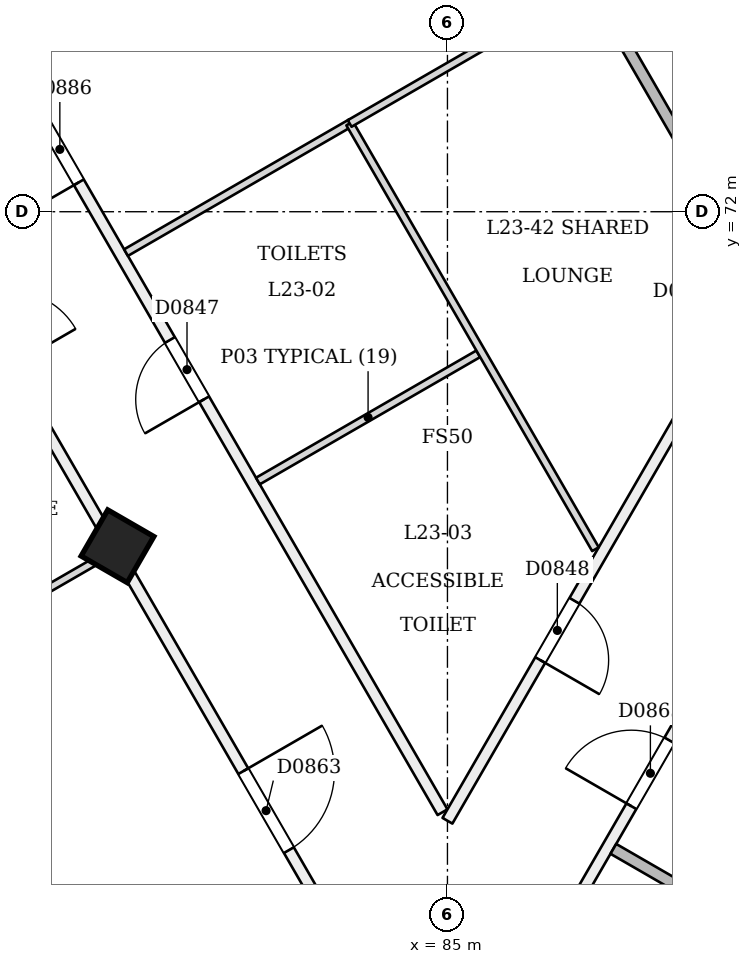
"""IFC4 building model, lengths in metres.
Left out: names, types, materials, properties, quantities, classifications, styles, units other than length and angle.
Written with IfcOpenShell. Run it as: python <this file> out.ifc"""

import sys

from ifc_helpers import new_model, si_unit, direction, frame, frame_2d, origin, origin_2d, place, context, subcontext, project, spatial, rectangle, extrude, element, fill, save


model = new_model("IFC4")
c1 = context("Model", 3, precision=1e-05, world=origin(), true_north=direction((0.0, 1.0)))
c2 = subcontext(c1, "Body", "Model", "MODEL_VIEW")
j1 = project(units=[si_unit("LENGTHUNIT", "METRE"), si_unit("PLANEANGLEUNIT", "RADIAN")], contexts=[c1])
p1 = place(None, origin())
s1 = spatial("IfcSite", under=j1, at=p1, CompositionType="ELEMENT")
p2 = place(p1, origin())
s2 = spatial("IfcBuilding", under=s1, at=p2, CompositionType="ELEMENT")
p3 = place(p2, frame((0.0, 0.0, 91.8)))
s3 = spatial("IfcBuildingStorey", under=s2, at=p3, CompositionType="ELEMENT", Elevation=91.8)
p4 = place(p3, frame((80.632, 67.552, -0.021), z_axis=(0.02215519141, 0.038415882353, 0.999016199807), x_axis=(-0.865361930339, -0.499673644695, 0.03840544644)))
e1 = element("IfcColumn", 1, at=p4, inside=s3, PredefinedType="COLUMN", context=c2, shape_type="SweptSolid", body=[
    extrude(rectangle(XDim=0.7, YDim=0.7, at=origin_2d()), origin(), (0.0, 0.0, 1.0), 3.604),
])
p5 = place(p3, frame((84.935, 64.1, 0.0), z_axis=(0.0, 0.0, 1.0), x_axis=(-0.500003132916, 0.866023594987, 0.0)))
e2 = element("IfcWall", 2, at=p5, inside=s3, PredefinedType="PARTITIONING", context=c2, shape_type="SweptSolid", body=[
    extrude(rectangle(XDim=30.368, YDim=0.15, at=frame_2d((15.184, 0.0))), origin(), (0.0, 0.0, 1.0), 3.3),
])
p6 = place(p5, frame((6.273, 0.0, 0.0)))
e3 = element("IfcOpeningElement", 3, at=p6, cuts=e2, PredefinedType="OPENING", context=c2, shape_type="SweptSolid", body=[
    extrude(rectangle(XDim=0.9, YDim=2.1, at=frame_2d((0.45, 1.05))), frame((0.0, 0.085, 0.0), z_axis=(0.0, -1.0, 0.0), x_axis=(1.0, 0.0, 0.0)), (0.0, 0.0, 1.0), 0.171),
])
p7 = place(p5, frame((21.525, 0.0, 0.0)))
e4 = element("IfcOpeningElement", 4, at=p7, cuts=e2, PredefinedType="OPENING", context=c2, shape_type="SweptSolid", body=[
    extrude(rectangle(XDim=1.0, YDim=2.1, at=frame_2d((0.5, 1.05))), frame((0.0, 0.085, 0.0), z_axis=(0.0, -1.0, 0.0), x_axis=(1.0, 0.0, 0.0)), (0.0, 0.0, 1.0), 0.171),
])
p8 = place(p5, frame((16.921, 0.0, 0.0)))
e5 = element("IfcOpeningElement", 5, at=p8, cuts=e2, PredefinedType="OPENING", context=c2, shape_type="SweptSolid", body=[
    extrude(rectangle(XDim=1.0, YDim=2.1, at=frame_2d((0.5, 1.05))), frame((0.0, 0.085, 0.0), z_axis=(0.0, -1.0, 0.0), x_axis=(1.0, 0.0, 0.0)), (0.0, 0.0, 1.0), 0.171),
])
p9 = place(p5, frame((26.041, 0.0, 0.0)))
e6 = element("IfcOpeningElement", 6, at=p9, cuts=e2, PredefinedType="OPENING", context=c2, shape_type="SweptSolid", body=[
    extrude(rectangle(XDim=1.0, YDim=2.1, at=frame_2d((0.5, 1.05))), frame((0.0, 0.085, 0.0), z_axis=(0.0, -1.0, 0.0), x_axis=(1.0, 0.0, 0.0)), (0.0, 0.0, 1.0), 0.171),
])
p10 = place(p5, frame((12.9, 0.0, 0.0)))
e7 = element("IfcOpeningElement", 7, at=p10, cuts=e2, PredefinedType="OPENING", context=c2, shape_type="SweptSolid", body=[
    extrude(rectangle(XDim=1.0, YDim=2.1, at=frame_2d((0.5, 1.05))), frame((0.0, 0.085, 0.0), z_axis=(0.0, -1.0, 0.0), x_axis=(1.0, 0.0, 0.0)), (0.0, 0.0, 1.0), 0.171),
])
p11 = place(p5, frame((9.569, 0.0, 0.0)))
e8 = element("IfcOpeningElement", 8, at=p11, cuts=e2, PredefinedType="OPENING", context=c2, shape_type="SweptSolid", body=[
    extrude(rectangle(XDim=1.0, YDim=2.1, at=frame_2d((0.5, 1.05))), frame((0.0, 0.085, 0.0), z_axis=(0.0, -1.0, 0.0), x_axis=(1.0, 0.0, 0.0)), (0.0, 0.0, 1.0), 0.171),
])
p12 = place(p3, frame((100.249, 90.4, 0.0), z_axis=(0.0, 0.0, 1.0), x_axis=(-0.500002168127, -0.866024152012, 0.0)))
e9 = element("IfcWall", 9, at=p12, inside=s3, PredefinedType="PARTITIONING", context=c2, shape_type="SweptSolid", body=[
    extrude(rectangle(XDim=30.498, YDim=0.15, at=frame_2d((15.249, 0.0))), origin(), (0.0, 0.0, 1.0), 3.3),
])
p13 = place(p12, frame((27.157, 0.0, 0.0)))
e10 = element("IfcOpeningElement", 10, at=p13, cuts=e9, PredefinedType="OPENING", context=c2, shape_type="SweptSolid", body=[
    extrude(rectangle(XDim=0.9, YDim=2.1, at=frame_2d((0.45, 1.05))), frame((0.0, 0.085, 0.0), z_axis=(0.0, -1.0, 0.0), x_axis=(1.0, 0.0, 0.0)), (0.0, 0.0, 1.0), 0.171),
])
p14 = place(p12, frame((2.412, 0.0, 0.0)))
e11 = element("IfcOpeningElement", 11, at=p14, cuts=e9, PredefinedType="OPENING", context=c2, shape_type="SweptSolid", body=[
    extrude(rectangle(XDim=1.0, YDim=2.1, at=frame_2d((0.5, 1.05))), frame((0.0, 0.085, 0.0), z_axis=(0.0, -1.0, 0.0), x_axis=(1.0, 0.0, 0.0)), (0.0, 0.0, 1.0), 0.171),
])
p15 = place(p12, frame((11.533, 0.0, 0.0)))
e12 = element("IfcOpeningElement", 12, at=p15, cuts=e9, PredefinedType="OPENING", context=c2, shape_type="SweptSolid", body=[
    extrude(rectangle(XDim=1.0, YDim=2.1, at=frame_2d((0.5, 1.05))), frame((0.0, 0.085, 0.0), z_axis=(0.0, -1.0, 0.0), x_axis=(1.0, 0.0, 0.0)), (0.0, 0.0, 1.0), 0.171),
])
p16 = place(p12, frame((18.89, 0.0, 0.0)))
e13 = element("IfcOpeningElement", 13, at=p16, cuts=e9, PredefinedType="OPENING", context=c2, shape_type="SweptSolid", body=[
    extrude(rectangle(XDim=1.2, YDim=2.1, at=frame_2d((0.6, 1.05))), frame((0.0, 0.085, 0.0), z_axis=(0.0, -1.0, 0.0), x_axis=(1.0, 0.0, 0.0)), (0.0, 0.0, 1.0), 0.171),
])
p17 = place(p12, frame((7.003, 0.0, 0.0)))
e14 = element("IfcOpeningElement", 14, at=p17, cuts=e9, PredefinedType="OPENING", context=c2, shape_type="SweptSolid", body=[
    extrude(rectangle(XDim=1.0, YDim=2.1, at=frame_2d((0.5, 1.05))), frame((0.0, 0.085, 0.0), z_axis=(0.0, -1.0, 0.0), x_axis=(1.0, 0.0, 0.0)), (0.0, 0.0, 1.0), 0.171),
])
p18 = place(p12, frame((15.43, 0.0, 0.0)))
e15 = element("IfcOpeningElement", 15, at=p18, cuts=e9, PredefinedType="OPENING", context=c2, shape_type="SweptSolid", body=[
    extrude(rectangle(XDim=1.0, YDim=2.1, at=frame_2d((0.5, 1.05))), frame((0.0, 0.085, 0.0), z_axis=(0.0, -1.0, 0.0), x_axis=(1.0, 0.0, 0.0)), (0.0, 0.0, 1.0), 0.171),
])
p19 = place(p12, frame((22.512, 0.0, 0.0)))
e16 = element("IfcOpeningElement", 16, at=p19, cuts=e9, PredefinedType="OPENING", context=c2, shape_type="SweptSolid", body=[
    extrude(rectangle(XDim=1.2, YDim=2.1, at=frame_2d((0.6, 1.05))), frame((0.0, 0.085, 0.0), z_axis=(0.0, -1.0, 0.0), x_axis=(1.0, 0.0, 0.0)), (0.0, 0.0, 1.0), 0.171),
])
p20 = place(p3, frame((63.319, 97.54, 0.0), z_axis=(0.0, 0.0, 1.0), x_axis=(0.500001382442, -0.86602460563, 0.0)))
e17 = element("IfcWall", 17, at=p20, inside=s3, PredefinedType="PARTITIONING", context=c2, shape_type="SweptSolid", body=[
    extrude(rectangle(XDim=42.252, YDim=0.15, at=frame_2d((21.126, 0.0))), origin(), (0.0, 0.0, 1.0), 2.9),
])
p21 = place(p20, frame((3.076, 0.0, 0.0)))
e18 = element("IfcOpeningElement", 18, at=p21, cuts=e17, PredefinedType="OPENING", context=c2, shape_type="SweptSolid", body=[
    extrude(rectangle(XDim=1.2, YDim=2.1, at=frame_2d((0.6, 1.05))), frame((0.0, 0.085, 0.0), z_axis=(0.0, -1.0, 0.0), x_axis=(1.0, 0.0, 0.0)), (0.0, 0.0, 1.0), 0.171),
])
p22 = place(p20, frame((10.455, 0.0, 0.0)))
e19 = element("IfcOpeningElement", 19, at=p22, cuts=e17, PredefinedType="OPENING", context=c2, shape_type="SweptSolid", body=[
    extrude(rectangle(XDim=1.1, YDim=2.1, at=frame_2d((0.55, 1.05))), frame((0.0, 0.085, 0.0), z_axis=(0.0, -1.0, 0.0), x_axis=(1.0, 0.0, 0.0)), (0.0, 0.0, 1.0), 0.171),
])
p23 = place(p20, frame((13.876, 0.0, 0.0)))
e20 = element("IfcOpeningElement", 20, at=p23, cuts=e17, PredefinedType="OPENING", context=c2, shape_type="SweptSolid", body=[
    extrude(rectangle(XDim=1.0, YDim=2.1, at=frame_2d((0.5, 1.05))), frame((0.0, 0.085, 0.0), z_axis=(0.0, -1.0, 0.0), x_axis=(1.0, 0.0, 0.0)), (0.0, 0.0, 1.0), 0.171),
])
p24 = place(p20, frame((18.376, 0.0, 0.0)))
e21 = element("IfcOpeningElement", 21, at=p24, cuts=e17, PredefinedType="OPENING", context=c2, shape_type="SweptSolid", body=[
    extrude(rectangle(XDim=1.0, YDim=2.1, at=frame_2d((0.5, 1.05))), frame((0.0, 0.085, 0.0), z_axis=(0.0, -1.0, 0.0), x_axis=(1.0, 0.0, 0.0)), (0.0, 0.0, 1.0), 0.171),
])
p25 = place(p20, frame((21.731, 0.0, 0.0)))
e22 = element("IfcOpeningElement", 22, at=p25, cuts=e17, PredefinedType="OPENING", context=c2, shape_type="SweptSolid", body=[
    extrude(rectangle(XDim=1.0, YDim=2.1, at=frame_2d((0.5, 1.05))), frame((0.0, 0.085, 0.0), z_axis=(0.0, -1.0, 0.0), x_axis=(1.0, 0.0, 0.0)), (0.0, 0.0, 1.0), 0.171),
])
p26 = place(p20, frame((28.406, 0.0, 0.0)))
e23 = element("IfcOpeningElement", 23, at=p26, cuts=e17, PredefinedType="OPENING", context=c2, shape_type="SweptSolid", body=[
    extrude(rectangle(XDim=1.0, YDim=2.1, at=frame_2d((0.5, 1.05))), frame((0.0, 0.085, 0.0), z_axis=(0.0, -1.0, 0.0), x_axis=(1.0, 0.0, 0.0)), (0.0, 0.0, 1.0), 0.171),
])
p27 = place(p20, frame((30.847, 0.0, 0.0)))
e24 = element("IfcOpeningElement", 24, at=p27, cuts=e17, PredefinedType="OPENING", context=c2, shape_type="SweptSolid", body=[
    extrude(rectangle(XDim=1.0, YDim=2.1, at=frame_2d((0.5, 1.05))), frame((0.0, 0.085, 0.0), z_axis=(0.0, -1.0, 0.0), x_axis=(1.0, 0.0, 0.0)), (0.0, 0.0, 1.0), 0.171),
])
p28 = place(p20, frame((37.989, 0.0, 0.0)))
e25 = element("IfcOpeningElement", 25, at=p28, cuts=e17, PredefinedType="OPENING", context=c2, shape_type="SweptSolid", body=[
    extrude(rectangle(XDim=1.2, YDim=2.1, at=frame_2d((0.6, 1.05))), frame((0.0, 0.085, 0.0), z_axis=(0.0, -1.0, 0.0), x_axis=(1.0, 0.0, 0.0)), (0.0, 0.0, 1.0), 0.171),
])
p29 = place(p3, frame((85.554, 60.948, 0.0), z_axis=(0.0, 0.0, 1.0), x_axis=(0.500001382442, 0.86602460563, 0.0)))
e26 = element("IfcWall", 26, at=p29, inside=s3, PredefinedType="PARTITIONING", context=c2, shape_type="SweptSolid", body=[
    extrude(rectangle(XDim=42.252, YDim=0.15, at=frame_2d((21.126, 0.0))), origin(), (0.0, 0.0, 1.0), 2.9),
])
p30 = place(p29, frame((0.285, 0.0, 0.0)))
e27 = element("IfcOpeningElement", 27, at=p30, cuts=e26, PredefinedType="OPENING", context=c2, shape_type="SweptSolid", body=[
    extrude(rectangle(XDim=1.2, YDim=2.1, at=frame_2d((0.6, 1.05))), frame((0.0, 0.085, 0.0), z_axis=(0.0, -1.0, 0.0), x_axis=(1.0, 0.0, 0.0)), (0.0, 0.0, 1.0), 0.171),
])
p31 = place(p29, frame((3.731, 0.0, 0.0)))
e28 = element("IfcOpeningElement", 28, at=p31, cuts=e26, PredefinedType="OPENING", context=c2, shape_type="SweptSolid", body=[
    extrude(rectangle(XDim=1.0, YDim=2.1, at=frame_2d((0.5, 1.05))), frame((0.0, 0.085, 0.0), z_axis=(0.0, -1.0, 0.0), x_axis=(1.0, 0.0, 0.0)), (0.0, 0.0, 1.0), 0.171),
])
p32 = place(p29, frame((11.526, 0.0, 0.0)))
e29 = element("IfcOpeningElement", 29, at=p32, cuts=e26, PredefinedType="OPENING", context=c2, shape_type="SweptSolid", body=[
    extrude(rectangle(XDim=1.2, YDim=2.1, at=frame_2d((0.6, 1.05))), frame((0.0, 0.085, 0.0), z_axis=(0.0, -1.0, 0.0), x_axis=(1.0, 0.0, 0.0)), (0.0, 0.0, 1.0), 0.171),
])
p33 = place(p29, frame((18.376, 0.0, 0.0)))
e30 = element("IfcOpeningElement", 30, at=p33, cuts=e26, PredefinedType="OPENING", context=c2, shape_type="SweptSolid", body=[
    extrude(rectangle(XDim=1.0, YDim=2.1, at=frame_2d((0.5, 1.05))), frame((0.0, 0.085, 0.0), z_axis=(0.0, -1.0, 0.0), x_axis=(1.0, 0.0, 0.0)), (0.0, 0.0, 1.0), 0.171),
])
p34 = place(p29, frame((21.731, 0.0, 0.0)))
e31 = element("IfcOpeningElement", 31, at=p34, cuts=e26, PredefinedType="OPENING", context=c2, shape_type="SweptSolid", body=[
    extrude(rectangle(XDim=1.0, YDim=2.1, at=frame_2d((0.5, 1.05))), frame((0.0, 0.085, 0.0), z_axis=(0.0, -1.0, 0.0), x_axis=(1.0, 0.0, 0.0)), (0.0, 0.0, 1.0), 0.171),
])
p35 = place(p29, frame((27.376, 0.0, 0.0)))
e32 = element("IfcOpeningElement", 32, at=p35, cuts=e26, PredefinedType="OPENING", context=c2, shape_type="SweptSolid", body=[
    extrude(rectangle(XDim=1.0, YDim=2.1, at=frame_2d((0.5, 1.05))), frame((0.0, 0.085, 0.0), z_axis=(0.0, -1.0, 0.0), x_axis=(1.0, 0.0, 0.0)), (0.0, 0.0, 1.0), 0.171),
])
p36 = place(p29, frame((30.697, 0.0, 0.0)))
e33 = element("IfcOpeningElement", 33, at=p36, cuts=e26, PredefinedType="OPENING", context=c2, shape_type="SweptSolid", body=[
    extrude(rectangle(XDim=1.1, YDim=2.1, at=frame_2d((0.55, 1.05))), frame((0.0, 0.085, 0.0), z_axis=(0.0, -1.0, 0.0), x_axis=(1.0, 0.0, 0.0)), (0.0, 0.0, 1.0), 0.171),
])
p37 = place(p29, frame((37.976, 0.0, 0.0)))
e34 = element("IfcOpeningElement", 34, at=p37, cuts=e26, PredefinedType="OPENING", context=c2, shape_type="SweptSolid", body=[
    extrude(rectangle(XDim=1.2, YDim=2.1, at=frame_2d((0.6, 1.05))), frame((0.0, 0.085, 0.0), z_axis=(0.0, -1.0, 0.0), x_axis=(1.0, 0.0, 0.0)), (0.0, 0.0, 1.0), 0.171),
])
p38 = place(p3, frame((82.506, 68.457, 0.0), z_axis=(0.0, 0.0, 1.0), x_axis=(0.866039839502, 0.499974995771, 0.0)))
e35 = element("IfcWall", 35, at=p38, inside=s3, PredefinedType="PARTITIONING", context=c2, shape_type="SweptSolid", body=[
    extrude(rectangle(XDim=3.347, YDim=0.1, at=frame_2d((1.674, 0.0))), origin(), (0.0, 0.0, 1.0), 3.3),
])
p39 = place(p3, frame((83.731, 73.171, 0.0), z_axis=(0.0, 0.0, 1.0), x_axis=(-0.8660321259, -0.499988356774, 0.0)))
e36 = element("IfcWall", 36, at=p39, inside=s3, PredefinedType="PARTITIONING", context=c2, shape_type="SweptSolid", body=[
    extrude(rectangle(XDim=3.417, YDim=0.1, at=frame_2d((1.709, 0.0))), origin(), (0.0, 0.0, 1.0), 3.3),
])
p40 = place(p3, frame((86.947, 67.56, 0.0), z_axis=(0.0, 0.0, 1.0), x_axis=(-0.499983865786, 0.866034718677, 0.0)))
e37 = element("IfcWall", 37, at=p40, inside=s3, PredefinedType="PARTITIONING", context=c2, shape_type="SweptSolid", body=[
    extrude(rectangle(XDim=6.468, YDim=0.1, at=frame_2d((3.234, 0.0))), origin(), (0.0, 0.0, 1.0), 3.3),
])
p41 = place(p3, frame((75.09, 64.353, 0.0), z_axis=(0.0, 0.0, 1.0), x_axis=(0.866032601554, 0.49998753289, 0.0)))
e38 = element("IfcWall", 38, at=p41, inside=s3, PredefinedType="PARTITIONING", context=c2, shape_type="SweptSolid", body=[
    extrude(rectangle(XDim=6.325, YDim=0.1, at=frame_2d((3.163, 0.0))), origin(), (0.0, 0.0, 1.0), 2.9),
])
p42 = place(p3, frame((92.678, 60.445, 0.0), z_axis=(0.0, 0.0, 1.0), x_axis=(-0.866025401434, 0.500000004071, 0.0)))
e39 = element("IfcWall", 39, at=p42, inside=s3, PredefinedType="PARTITIONING", context=c2, shape_type="SweptSolid", body=[
    extrude(rectangle(XDim=6.345, YDim=0.15, at=frame_2d((3.173, 0.0))), origin(), (0.0, 0.0, 1.0), 3.3),
])
p43 = place(p3, frame((86.883, 74.991, 0.0), z_axis=(0.0, 0.0, 1.0), x_axis=(0.500004862322, -0.866022596503, 0.0)))
e40 = element("IfcWall", 40, at=p43, inside=s3, PredefinedType="PARTITIONING", context=c2, shape_type="SweptSolid", body=[
    extrude(rectangle(XDim=4.34, YDim=0.15, at=frame_2d((2.17, 0.0))), origin(), (0.0, 0.0, 1.0), 3.3),
])
p44 = place(p3, frame((83.713, 73.161, 0.0), z_axis=(0.0, 0.0, 1.0), x_axis=(0.866042269935, 0.499970785833, 0.0)))
e41 = element("IfcWall", 41, at=p44, inside=s3, PredefinedType="PARTITIONING", context=c2, shape_type="SweptSolid", body=[
    extrude(rectangle(XDim=3.659, YDim=0.1, at=frame_2d((1.83, 0.0))), origin(), (0.0, 0.0, 1.0), 3.3),
])
p45 = place(p6, origin())
e42 = element("IfcDoor", 42, at=p45, inside=s3, OperationType="SINGLE_SWING_LEFT", PredefinedType="NOTDEFINED", context=c2, shape_type="SweptSolid", body=[
    extrude(rectangle(XDim=0.9, YDim=2.1, at=frame_2d((0.45, 1.05))), frame((0.0, 0.025, 0.0), z_axis=(0.0, -1.0, 0.0), x_axis=(1.0, 0.0, 0.0)), (0.0, 0.0, 1.0), 0.05),
])
fill(e3, e42)
p46 = place(p13, origin())
e43 = element("IfcDoor", 43, at=p46, inside=s3, OperationType="SINGLE_SWING_RIGHT", PredefinedType="NOTDEFINED", context=c2, shape_type="SweptSolid", body=[
    extrude(rectangle(XDim=0.9, YDim=2.1, at=frame_2d((0.45, 1.05))), frame((0.0, 0.025, 0.0), z_axis=(0.0, -1.0, 0.0), x_axis=(1.0, 0.0, 0.0)), (0.0, 0.0, 1.0), 0.05),
])
fill(e10, e43)
p47 = place(p28, origin())
e44 = element("IfcDoor", 44, at=p47, inside=s3, OperationType="SINGLE_SWING_LEFT", PredefinedType="NOTDEFINED", context=c2, shape_type="SweptSolid", body=[
    extrude(rectangle(XDim=1.2, YDim=2.1, at=frame_2d((0.6, 1.05))), frame((0.0, 0.025, 0.0), z_axis=(0.0, -1.0, 0.0), x_axis=(1.0, 0.0, 0.0)), (0.0, 0.0, 1.0), 0.05),
])
fill(e25, e44)
p48 = place(p31, origin())
e45 = element("IfcDoor", 45, at=p48, inside=s3, OperationType="SINGLE_SWING_LEFT", PredefinedType="NOTDEFINED", context=c2, shape_type="SweptSolid", body=[
    extrude(rectangle(XDim=1.0, YDim=2.1, at=frame_2d((0.5, 1.05))), frame((0.0, 0.025, 0.0), z_axis=(0.0, -1.0, 0.0), x_axis=(1.0, 0.0, 0.0)), (0.0, 0.0, 1.0), 0.05),
])
fill(e28, e45)
p49 = place(p11, origin())
e46 = element("IfcDoor", 46, at=p49, inside=s3, OperationType="SINGLE_SWING_LEFT", PredefinedType="NOTDEFINED", context=c2, shape_type="SweptSolid", body=[
    extrude(rectangle(XDim=1.0, YDim=2.1, at=frame_2d((0.5, 1.05))), frame((0.0, 0.025, 0.0), z_axis=(0.0, -1.0, 0.0), x_axis=(1.0, 0.0, 0.0)), (0.0, 0.0, 1.0), 0.05),
])
fill(e8, e46)
save(model, sys.argv[1])
